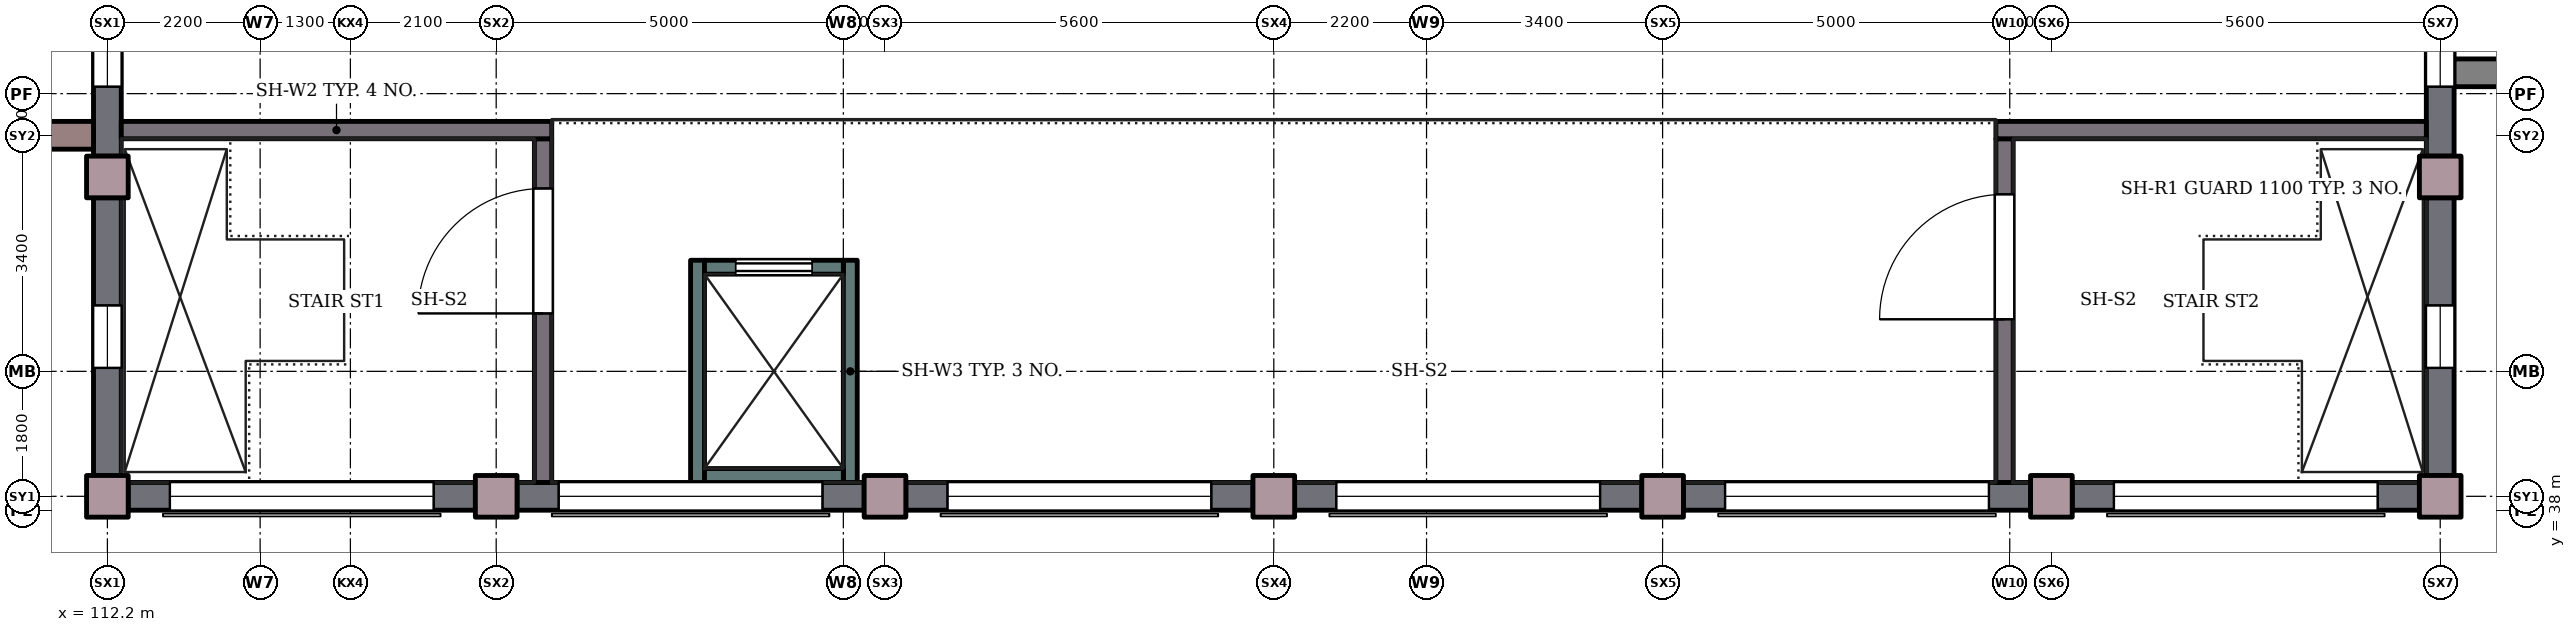
"""IFC4 building model, lengths in metres.
Left out: names, types, materials, properties, quantities, classifications, styles, units other than length and angle.
Written with IfcOpenShell. Run it as: python <this file> out.ifc"""

import sys

from ifc_helpers import new_model, si_unit, direction, frame, frame_2d, origin, origin_2d, place, context, subcontext, project, spatial, rectangle, extrude, element, fill, save


model = new_model("IFC4")
c1 = context("Model", 3, precision=1e-05, world=origin(), true_north=direction((0.0, 1.0)))
c2 = subcontext(c1, "Body", "Model", "MODEL_VIEW")
j1 = project(units=[si_unit("LENGTHUNIT", "METRE"), si_unit("PLANEANGLEUNIT", "RADIAN")], contexts=[c1])
p1 = place(None, origin())
s1 = spatial("IfcSite", under=j1, at=p1, CompositionType="ELEMENT")
p2 = place(p1, origin())
s2 = spatial("IfcBuilding", under=s1, at=p2, CompositionType="ELEMENT")
p3 = place(p2, frame((0.0, 0.0, 8.4)))
s3 = spatial("IfcBuildingStorey", under=s2, at=p3, CompositionType="ELEMENT", Elevation=8.4)
for number, where, z_axis, x_axis in (
    (1, (112.2, 38.2, 0.0), (0.0, 0.0, 1.0), (1.0, 0.0, 0.0)),
    (2, (117.8, 38.2, 0.0), (0.0, 0.0, 1.0), (1.0, 0.0, 0.0)),
    (3, (123.4, 38.2, 0.0), (0.0, 0.0, 1.0), (1.0, 0.0, 0.0)),
    (4, (129.0, 38.2, 0.0), (0.0, 0.0, 1.0), (1.0, 0.0, 0.0)),
    (5, (134.6, 38.2, 0.0), (0.0, 0.0, 1.0), (1.0, 0.0, 0.0)),
    (6, (140.2, 38.2, 0.0), (0.0, 0.0, 1.0), (1.0, 0.0, 0.0)),
    (7, (145.8, 38.2, 0.0), (0.0, 0.0, 1.0), (1.0, 0.0, 0.0)),
    (8, (112.2, 42.8, 0.0), (0.0, 0.0, 1.0), (1.0, 0.0, 0.0)),
    (9, (145.8, 42.8, 0.0), (0.0, 0.0, 1.0), (1.0, 0.0, 0.0)),
):
    element("IfcColumn", number, at=place(p3, frame(where, z_axis=z_axis, x_axis=x_axis)), inside=s3, PredefinedType="COLUMN", context=c2, shape_type="SweptSolid", body=[
        extrude(rectangle(XDim=0.6, YDim=0.6, at=origin_2d()), origin(), (0.0, 0.0, 1.0), 4.2),
    ])
p4 = place(p3, frame((117.5, 38.2, 0.0), z_axis=(0.0, 0.0, 1.0), x_axis=(-1.0, 0.0, 0.0)))
e10 = element("IfcWall", 10, at=p4, inside=s3, PredefinedType="SOLIDWALL", context=c2, shape_type="SweptSolid", body=[
    extrude(rectangle(XDim=5.0, YDim=0.4, at=frame_2d((2.5, 0.0))), origin(), (0.0, 0.0, 1.0), 4.2),
])
p5 = place(p4, frame((0.6, 0.0, 1.0)))
e11 = element("IfcOpeningElement", 11, at=p5, cuts=e10, PredefinedType="OPENING", context=c2, shape_type="SweptSolid", body=[
    extrude(rectangle(XDim=3.8, YDim=2.4, at=frame_2d((1.9, 1.2))), frame((0.0, 0.21, 0.0), z_axis=(0.0, -1.0, 0.0), x_axis=(1.0, 0.0, 0.0)), (0.0, 0.0, 1.0), 0.42),
])
p6 = place(p3, frame((123.1, 38.2, 0.0), z_axis=(0.0, 0.0, 1.0), x_axis=(-1.0, 0.0, 0.0)))
e12 = element("IfcWall", 12, at=p6, inside=s3, PredefinedType="SOLIDWALL", context=c2, shape_type="SweptSolid", body=[
    extrude(rectangle(XDim=5.0, YDim=0.4, at=frame_2d((2.5, 0.0))), origin(), (0.0, 0.0, 1.0), 4.2),
])
p7 = place(p6, frame((0.6, 0.0, 1.0)))
e13 = element("IfcOpeningElement", 13, at=p7, cuts=e12, PredefinedType="OPENING", context=c2, shape_type="SweptSolid", body=[
    extrude(rectangle(XDim=3.8, YDim=2.4, at=frame_2d((1.9, 1.2))), frame((0.0, 0.21, 0.0), z_axis=(0.0, -1.0, 0.0), x_axis=(1.0, 0.0, 0.0)), (0.0, 0.0, 1.0), 0.42),
])
p8 = place(p3, frame((128.7, 38.2, 0.0), z_axis=(0.0, 0.0, 1.0), x_axis=(-1.0, 0.0, 0.0)))
e14 = element("IfcWall", 14, at=p8, inside=s3, PredefinedType="SOLIDWALL", context=c2, shape_type="SweptSolid", body=[
    extrude(rectangle(XDim=5.0, YDim=0.4, at=frame_2d((2.5, 0.0))), origin(), (0.0, 0.0, 1.0), 4.2),
])
p9 = place(p8, frame((0.6, 0.0, 1.0)))
e15 = element("IfcOpeningElement", 15, at=p9, cuts=e14, PredefinedType="OPENING", context=c2, shape_type="SweptSolid", body=[
    extrude(rectangle(XDim=3.8, YDim=2.4, at=frame_2d((1.9, 1.2))), frame((0.0, 0.21, 0.0), z_axis=(0.0, -1.0, 0.0), x_axis=(1.0, 0.0, 0.0)), (0.0, 0.0, 1.0), 0.42),
])
p10 = place(p3, frame((134.3, 38.2, 0.0), z_axis=(0.0, 0.0, 1.0), x_axis=(-1.0, 0.0, 0.0)))
e16 = element("IfcWall", 16, at=p10, inside=s3, PredefinedType="SOLIDWALL", context=c2, shape_type="SweptSolid", body=[
    extrude(rectangle(XDim=5.0, YDim=0.4, at=frame_2d((2.5, 0.0))), origin(), (0.0, 0.0, 1.0), 4.2),
])
p11 = place(p10, frame((0.6, 0.0, 1.0)))
e17 = element("IfcOpeningElement", 17, at=p11, cuts=e16, PredefinedType="OPENING", context=c2, shape_type="SweptSolid", body=[
    extrude(rectangle(XDim=3.8, YDim=2.4, at=frame_2d((1.9, 1.2))), frame((0.0, 0.21, 0.0), z_axis=(0.0, -1.0, 0.0), x_axis=(1.0, 0.0, 0.0)), (0.0, 0.0, 1.0), 0.42),
])
p12 = place(p3, frame((139.9, 38.2, 0.0), z_axis=(0.0, 0.0, 1.0), x_axis=(-1.0, 0.0, 0.0)))
e18 = element("IfcWall", 18, at=p12, inside=s3, PredefinedType="SOLIDWALL", context=c2, shape_type="SweptSolid", body=[
    extrude(rectangle(XDim=5.0, YDim=0.4, at=frame_2d((2.5, 0.0))), origin(), (0.0, 0.0, 1.0), 4.2),
])
p13 = place(p12, frame((0.6, 0.0, 1.0)))
e19 = element("IfcOpeningElement", 19, at=p13, cuts=e18, PredefinedType="OPENING", context=c2, shape_type="SweptSolid", body=[
    extrude(rectangle(XDim=3.8, YDim=2.4, at=frame_2d((1.9, 1.2))), frame((0.0, 0.21, 0.0), z_axis=(0.0, -1.0, 0.0), x_axis=(1.0, 0.0, 0.0)), (0.0, 0.0, 1.0), 0.42),
])
p14 = place(p3, frame((145.5, 38.2, 0.0), z_axis=(0.0, 0.0, 1.0), x_axis=(-1.0, 0.0, 0.0)))
e20 = element("IfcWall", 20, at=p14, inside=s3, PredefinedType="SOLIDWALL", context=c2, shape_type="SweptSolid", body=[
    extrude(rectangle(XDim=5.0, YDim=0.4, at=frame_2d((2.5, 0.0))), origin(), (0.0, 0.0, 1.0), 4.2),
])
p15 = place(p14, frame((0.6, 0.0, 1.0)))
e21 = element("IfcOpeningElement", 21, at=p15, cuts=e20, PredefinedType="OPENING", context=c2, shape_type="SweptSolid", body=[
    extrude(rectangle(XDim=3.8, YDim=2.4, at=frame_2d((1.9, 1.2))), frame((0.0, 0.21, 0.0), z_axis=(0.0, -1.0, 0.0), x_axis=(1.0, 0.0, 0.0)), (0.0, 0.0, 1.0), 0.42),
])
p16 = place(p3, frame((112.2, 38.5, 0.0), z_axis=(0.0, 0.0, 1.0), x_axis=(0.0, 1.0, 0.0)))
e22 = element("IfcWall", 22, at=p16, inside=s3, PredefinedType="SOLIDWALL", context=c2, shape_type="SweptSolid", body=[
    extrude(rectangle(XDim=4.0, YDim=0.4, at=frame_2d((2.0, 0.0))), origin(), (0.0, 0.0, 1.0), 4.2),
])
p17 = place(p16, frame((1.55, 0.0, 0.9)))
e23 = element("IfcOpeningElement", 23, at=p17, cuts=e22, PredefinedType="OPENING", context=c2, shape_type="SweptSolid", body=[
    extrude(rectangle(XDim=0.9, YDim=1.5, at=frame_2d((0.45, 0.75))), frame((0.0, 0.21, 0.0), z_axis=(0.0, -1.0, 0.0), x_axis=(1.0, 0.0, 0.0)), (0.0, 0.0, 1.0), 0.42),
])
p18 = place(p3, frame((112.2, 43.1, 0.0), z_axis=(0.0, 0.0, 1.0), x_axis=(0.0, 1.0, 0.0)))
e24 = element("IfcWall", 24, at=p18, inside=s3, PredefinedType="SOLIDWALL", context=c2, shape_type="SweptSolid", body=[
    extrude(rectangle(XDim=4.0, YDim=0.4, at=frame_2d((2.0, 0.0))), origin(), (0.0, 0.0, 1.0), 4.2),
])
p19 = place(p18, frame((1.0, 0.0, 1.0)))
e25 = element("IfcOpeningElement", 25, at=p19, cuts=e24, PredefinedType="OPENING", context=c2, shape_type="SweptSolid", body=[
    extrude(rectangle(XDim=2.0, YDim=2.4, at=frame_2d((1.0, 1.2))), frame((0.0, 0.21, 0.0), z_axis=(0.0, -1.0, 0.0), x_axis=(1.0, 0.0, 0.0)), (0.0, 0.0, 1.0), 0.42),
])
p20 = place(p3, frame((145.8, 38.5, 0.0), z_axis=(0.0, 0.0, 1.0), x_axis=(0.0, 1.0, 0.0)))
e26 = element("IfcWall", 26, at=p20, inside=s3, PredefinedType="SOLIDWALL", context=c2, shape_type="SweptSolid", body=[
    extrude(rectangle(XDim=4.0, YDim=0.4, at=frame_2d((2.0, 0.0))), origin(), (0.0, 0.0, 1.0), 4.2),
])
p21 = place(p20, frame((1.55, 0.0, 0.9)))
e27 = element("IfcOpeningElement", 27, at=p21, cuts=e26, PredefinedType="OPENING", context=c2, shape_type="SweptSolid", body=[
    extrude(rectangle(XDim=0.9, YDim=1.5, at=frame_2d((0.45, 0.75))), frame((0.0, 0.21, 0.0), z_axis=(0.0, -1.0, 0.0), x_axis=(1.0, 0.0, 0.0)), (0.0, 0.0, 1.0), 0.42),
])
p22 = place(p3, frame((145.8, 43.1, 0.0), z_axis=(0.0, 0.0, 1.0), x_axis=(0.0, 1.0, 0.0)))
e28 = element("IfcWall", 28, at=p22, inside=s3, PredefinedType="SOLIDWALL", context=c2, shape_type="SweptSolid", body=[
    extrude(rectangle(XDim=4.0, YDim=0.4, at=frame_2d((2.0, 0.0))), origin(), (0.0, 0.0, 1.0), 4.2),
])
p23 = place(p22, frame((1.0, 0.0, 1.0)))
e29 = element("IfcOpeningElement", 29, at=p23, cuts=e28, PredefinedType="OPENING", context=c2, shape_type="SweptSolid", body=[
    extrude(rectangle(XDim=2.0, YDim=2.4, at=frame_2d((1.0, 1.2))), frame((0.0, 0.21, 0.0), z_axis=(0.0, -1.0, 0.0), x_axis=(1.0, 0.0, 0.0)), (0.0, 0.0, 1.0), 0.42),
])
p24 = place(p3, frame((118.475, 38.4, 0.0), z_axis=(0.0, 0.0, 1.0), x_axis=(0.0, 1.0, 0.0)))
e30 = element("IfcWall", 30, at=p24, inside=s3, PredefinedType="SHEAR", context=c2, shape_type="SweptSolid", body=[
    extrude(rectangle(XDim=4.95, YDim=0.25, at=frame_2d((2.475, 0.0))), origin(), (0.0, 0.0, 1.0), 4.2),
])
p25 = place(p24, frame((2.434, 0.0, 0.0)))
e31 = element("IfcOpeningElement", 31, at=p25, cuts=e30, PredefinedType="OPENING", context=c2, shape_type="SweptSolid", body=[
    extrude(rectangle(XDim=1.8, YDim=2.1, at=frame_2d((0.9, 1.05))), frame((0.0, 0.135, 0.0), z_axis=(0.0, -1.0, 0.0), x_axis=(1.0, 0.0, 0.0)), (0.0, 0.0, 1.0), 0.27),
])
p26 = place(p3, frame((112.4, 43.475, 0.0), z_axis=(0.0, 0.0, 1.0), x_axis=(1.0, 0.0, 0.0)))
e32 = element("IfcWall", 32, at=p26, inside=s3, PredefinedType="SHEAR", context=c2, shape_type="SweptSolid", body=[
    extrude(rectangle(XDim=6.2, YDim=0.25, at=frame_2d((3.1, 0.0))), origin(), (0.0, 0.0, 1.0), 4.2),
])
p27 = place(p3, frame((139.525, 38.4, 0.0), z_axis=(0.0, 0.0, 1.0), x_axis=(0.0, 1.0, 0.0)))
e33 = element("IfcWall", 33, at=p27, inside=s3, PredefinedType="SHEAR", context=c2, shape_type="SweptSolid", body=[
    extrude(rectangle(XDim=4.95, YDim=0.25, at=frame_2d((2.475, 0.0))), origin(), (0.0, 0.0, 1.0), 4.2),
])
p28 = place(p27, frame((2.35, 0.0, 0.0)))
e34 = element("IfcOpeningElement", 34, at=p28, cuts=e33, PredefinedType="OPENING", context=c2, shape_type="SweptSolid", body=[
    extrude(rectangle(XDim=1.8, YDim=2.1, at=frame_2d((0.9, 1.05))), frame((0.0, 0.135, 0.0), z_axis=(0.0, -1.0, 0.0), x_axis=(1.0, 0.0, 0.0)), (0.0, 0.0, 1.0), 0.27),
])
p29 = place(p3, frame((139.4, 43.475, 0.0), z_axis=(0.0, 0.0, 1.0), x_axis=(1.0, 0.0, 0.0)))
e35 = element("IfcWall", 35, at=p29, inside=s3, PredefinedType="SHEAR", context=c2, shape_type="SweptSolid", body=[
    extrude(rectangle(XDim=6.2, YDim=0.25, at=frame_2d((3.1, 0.0))), origin(), (0.0, 0.0, 1.0), 4.2),
])
for number, where, z_axis, x_axis in (
    (36, (120.7, 38.4, 0.0), (0.0, 0.0, 1.0), (0.0, 1.0, 0.0)),
    (37, (122.9, 38.4, 0.0), (0.0, 0.0, 1.0), (0.0, 1.0, 0.0)),
):
    element("IfcWall", number, at=place(p3, frame(where, z_axis=z_axis, x_axis=x_axis)), inside=s3, PredefinedType="SHEAR", context=c2, shape_type="SweptSolid", body=[
        extrude(rectangle(XDim=3.2, YDim=0.2, at=frame_2d((1.6, 0.0))), origin(), (0.0, 0.0, 1.0), 4.2),
    ])
p30 = place(p3, frame((120.8, 38.5, 0.0), z_axis=(0.0, 0.0, 1.0), x_axis=(1.0, 0.0, 0.0)))
e38 = element("IfcWall", 38, at=p30, inside=s3, PredefinedType="SHEAR", context=c2, shape_type="SweptSolid", body=[
    extrude(rectangle(XDim=2.0, YDim=0.2, at=frame_2d((1.0, 0.0))), origin(), (0.0, 0.0, 1.0), 4.2),
])
p31 = place(p3, frame((120.8, 41.5, 0.0), z_axis=(0.0, 0.0, 1.0), x_axis=(1.0, 0.0, 0.0)))
e39 = element("IfcWall", 39, at=p31, inside=s3, PredefinedType="SHEAR", context=c2, shape_type="SweptSolid", body=[
    extrude(rectangle(XDim=2.0, YDim=0.2, at=frame_2d((1.0, 0.0))), origin(), (0.0, 0.0, 1.0), 4.2),
])
p32 = place(p31, frame((0.45, 0.0, 0.0)))
e40 = element("IfcOpeningElement", 40, at=p32, cuts=e39, PredefinedType="OPENING", context=c2, shape_type="SweptSolid", body=[
    extrude(rectangle(XDim=1.1, YDim=2.1, at=frame_2d((0.55, 1.05))), frame((0.0, 0.11, 0.0), z_axis=(0.0, -1.0, 0.0), x_axis=(1.0, 0.0, 0.0)), (0.0, 0.0, 1.0), 0.22),
])
p33 = place(p3, frame((110.3, 43.4, 0.0), z_axis=(0.0, 0.0, 1.0), x_axis=(1.0, 0.0, 0.0)))
e41 = element("IfcWall", 41, at=p33, inside=s3, PredefinedType="STANDARD", context=c2, shape_type="SweptSolid", body=[
    extrude(rectangle(XDim=1.7, YDim=0.4, at=frame_2d((0.85, 0.0))), origin(), (0.0, 0.0, 1.0), 4.2),
])
p34 = place(p3, frame((148.1, 44.3, 0.0), z_axis=(0.0, 0.0, 1.0), x_axis=(-1.0, 0.0, 0.0)))
e42 = element("IfcWall", 42, at=p34, inside=s3, PredefinedType="STANDARD", context=c2, shape_type="SweptSolid", body=[
    extrude(rectangle(XDim=2.1, YDim=0.4, at=frame_2d((1.05, 0.0))), origin(), (0.0, 0.0, 1.0), 4.2),
])
p35 = place(p17, origin())
e43 = element("IfcWindow", 43, at=p35, inside=s3, PartitioningType="SINGLE_PANEL", PredefinedType="WINDOW", context=c2, shape_type="SweptSolid", body=[
    extrude(rectangle(XDim=0.9, YDim=1.5, at=frame_2d((0.45, 0.75))), frame((0.0, 0.03, 0.0), z_axis=(0.0, -1.0, 0.0), x_axis=(1.0, 0.0, 0.0)), (0.0, 0.0, 1.0), 0.06),
])
fill(e23, e43)
p36 = place(p21, origin())
e44 = element("IfcWindow", 44, at=p36, inside=s3, PartitioningType="SINGLE_PANEL", PredefinedType="WINDOW", context=c2, shape_type="SweptSolid", body=[
    extrude(rectangle(XDim=0.9, YDim=1.5, at=frame_2d((0.45, 0.75))), frame((0.0, 0.03, 0.0), z_axis=(0.0, -1.0, 0.0), x_axis=(1.0, 0.0, 0.0)), (0.0, 0.0, 1.0), 0.06),
])
fill(e27, e44)
p37 = place(p19, origin())
e45 = element("IfcWindow", 45, at=p37, inside=s3, PartitioningType="SINGLE_PANEL", PredefinedType="WINDOW", context=c2, shape_type="SweptSolid", body=[
    extrude(rectangle(XDim=2.0, YDim=2.4, at=frame_2d((1.0, 1.2))), frame((0.0, 0.03, 0.0), z_axis=(0.0, -1.0, 0.0), x_axis=(1.0, 0.0, 0.0)), (0.0, 0.0, 1.0), 0.06),
])
fill(e25, e45)
p38 = place(p23, origin())
e46 = element("IfcWindow", 46, at=p38, inside=s3, PartitioningType="SINGLE_PANEL", PredefinedType="WINDOW", context=c2, shape_type="SweptSolid", body=[
    extrude(rectangle(XDim=2.0, YDim=2.4, at=frame_2d((1.0, 1.2))), frame((0.0, 0.03, 0.0), z_axis=(0.0, -1.0, 0.0), x_axis=(1.0, 0.0, 0.0)), (0.0, 0.0, 1.0), 0.06),
])
fill(e29, e46)
p39 = place(p5, origin())
e47 = element("IfcWindow", 47, at=p39, inside=s3, PartitioningType="SINGLE_PANEL", PredefinedType="WINDOW", context=c2, shape_type="SweptSolid", body=[
    extrude(rectangle(XDim=3.8, YDim=2.4, at=frame_2d((1.9, 1.2))), frame((0.0, 0.03, 0.0), z_axis=(0.0, -1.0, 0.0), x_axis=(1.0, 0.0, 0.0)), (0.0, 0.0, 1.0), 0.06),
])
fill(e11, e47)
p40 = place(p7, origin())
e48 = element("IfcWindow", 48, at=p40, inside=s3, PartitioningType="SINGLE_PANEL", PredefinedType="WINDOW", context=c2, shape_type="SweptSolid", body=[
    extrude(rectangle(XDim=3.8, YDim=2.4, at=frame_2d((1.9, 1.2))), frame((0.0, 0.03, 0.0), z_axis=(0.0, -1.0, 0.0), x_axis=(1.0, 0.0, 0.0)), (0.0, 0.0, 1.0), 0.06),
])
fill(e13, e48)
p41 = place(p9, origin())
e49 = element("IfcWindow", 49, at=p41, inside=s3, PartitioningType="SINGLE_PANEL", PredefinedType="WINDOW", context=c2, shape_type="SweptSolid", body=[
    extrude(rectangle(XDim=3.8, YDim=2.4, at=frame_2d((1.9, 1.2))), frame((0.0, 0.03, 0.0), z_axis=(0.0, -1.0, 0.0), x_axis=(1.0, 0.0, 0.0)), (0.0, 0.0, 1.0), 0.06),
])
fill(e15, e49)
p42 = place(p11, origin())
e50 = element("IfcWindow", 50, at=p42, inside=s3, PartitioningType="SINGLE_PANEL", PredefinedType="WINDOW", context=c2, shape_type="SweptSolid", body=[
    extrude(rectangle(XDim=3.8, YDim=2.4, at=frame_2d((1.9, 1.2))), frame((0.0, 0.03, 0.0), z_axis=(0.0, -1.0, 0.0), x_axis=(1.0, 0.0, 0.0)), (0.0, 0.0, 1.0), 0.06),
])
fill(e17, e50)
p43 = place(p13, origin())
e51 = element("IfcWindow", 51, at=p43, inside=s3, PartitioningType="SINGLE_PANEL", PredefinedType="WINDOW", context=c2, shape_type="SweptSolid", body=[
    extrude(rectangle(XDim=3.8, YDim=2.4, at=frame_2d((1.9, 1.2))), frame((0.0, 0.03, 0.0), z_axis=(0.0, -1.0, 0.0), x_axis=(1.0, 0.0, 0.0)), (0.0, 0.0, 1.0), 0.06),
])
fill(e19, e51)
p44 = place(p15, origin())
e52 = element("IfcWindow", 52, at=p44, inside=s3, PartitioningType="SINGLE_PANEL", PredefinedType="WINDOW", context=c2, shape_type="SweptSolid", body=[
    extrude(rectangle(XDim=3.8, YDim=2.4, at=frame_2d((1.9, 1.2))), frame((0.0, 0.03, 0.0), z_axis=(0.0, -1.0, 0.0), x_axis=(1.0, 0.0, 0.0)), (0.0, 0.0, 1.0), 0.06),
])
fill(e21, e52)
p45 = place(p32, origin())
e53 = element("IfcDoor", 53, at=p45, inside=s3, OperationType="SLIDING_TO_LEFT", PredefinedType="DOOR", context=c2, shape_type="SweptSolid", body=[
    extrude(rectangle(XDim=1.1, YDim=2.1, at=frame_2d((0.55, 1.05))), frame((0.0, 0.025, 0.0), z_axis=(0.0, -1.0, 0.0), x_axis=(1.0, 0.0, 0.0)), (0.0, 0.0, 1.0), 0.05),
])
fill(e40, e53)
p46 = place(p25, origin())
e54 = element("IfcDoor", 54, at=p46, inside=s3, OperationType="DOUBLE_DOOR_SINGLE_SWING", PredefinedType="DOOR", context=c2, shape_type="SweptSolid", body=[
    extrude(rectangle(XDim=1.8, YDim=2.1, at=frame_2d((0.9, 1.05))), frame((0.0, 0.025, 0.0), z_axis=(0.0, -1.0, 0.0), x_axis=(1.0, 0.0, 0.0)), (0.0, 0.0, 1.0), 0.05),
])
fill(e31, e54)
p47 = place(p28, origin())
e55 = element("IfcDoor", 55, at=p47, inside=s3, OperationType="DOUBLE_DOOR_SINGLE_SWING", PredefinedType="DOOR", context=c2, shape_type="SweptSolid", body=[
    extrude(rectangle(XDim=1.8, YDim=2.1, at=frame_2d((0.9, 1.05))), frame((0.0, 0.025, 0.0), z_axis=(0.0, -1.0, 0.0), x_axis=(1.0, 0.0, 0.0)), (0.0, 0.0, 1.0), 0.05),
])
fill(e34, e55)
save(model, sys.argv[1])
